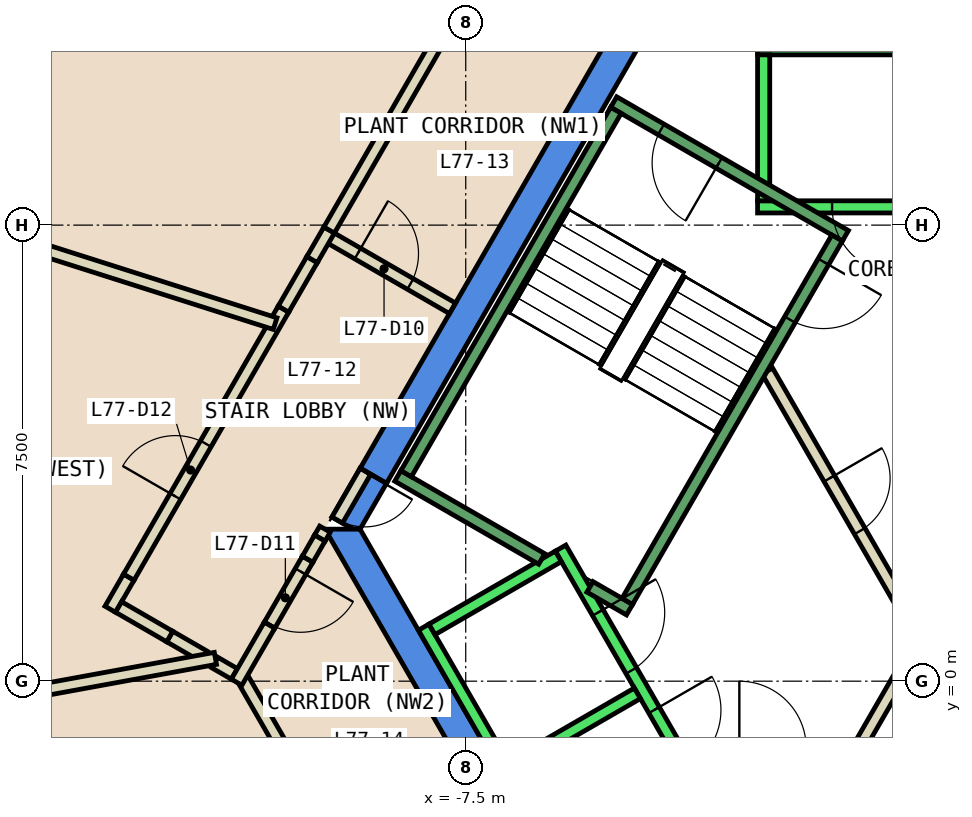
"""IFC4 building model, lengths in metres.
Left out: names, types, materials, properties, quantities, classifications, styles, units other than length and angle.
Written with IfcOpenShell. Run it as: python <this file> out.ifc"""

import sys

from ifc_helpers import new_model, si_unit, direction, frame, frame_2d, origin, place, context, subcontext, project, spatial, polyline, rectangle, outline, extrude, element, fill, save


model = new_model("IFC4")
c1 = context("Model", 3, precision=1e-05, world=origin(), true_north=direction((0.0, 1.0)))
c2 = subcontext(c1, "Body", "Model", "MODEL_VIEW")
j1 = project(units=[si_unit("LENGTHUNIT", "METRE"), si_unit("PLANEANGLEUNIT", "RADIAN")], contexts=[c1])
p1 = place(None, origin())
s1 = spatial("IfcSite", under=j1, at=p1, CompositionType="ELEMENT")
p2 = place(p1, origin())
s2 = spatial("IfcBuilding", under=s1, at=p2, CompositionType="ELEMENT")
p3 = place(p2, frame((0.0, 0.0, 326.0)))
s3 = spatial("IfcBuildingStorey", under=s2, at=p3, CompositionType="ELEMENT", Elevation=326.0)
p4 = place(p3, frame((0.0, 0.0, -0.6)))
e1 = element("IfcWall", 1, at=p4, inside=s3, PredefinedType="SHEAR", context=c2, shape_type="SweptSolid", body=[
    extrude(outline(polyline([(-9.236, 3.502), (-8.803, 3.253), (-4.619, 10.5), (-4.907, 11.0), (-9.236, 3.502)])), origin(), (0.0, 0.0, 1.0), 5.55),
])
p5 = place(p3, frame((0.0, 0.0, 3.6)))
e2 = element("IfcWall", 2, at=p5, inside=s3, PredefinedType="SHEAR", context=c2, shape_type="SweptSolid", body=[
    extrude(outline(polyline([(-9.7, 2.7), (-9.354, 2.5), (-9.238, 2.5), (-8.803, 3.253), (-9.236, 3.502), (-9.7, 2.7)])), origin(), (0.0, 0.0, 1.0), 1.35),
])
p6 = place(p3, frame((0.0, 0.0, -0.6)))
e3 = element("IfcWall", 3, at=p6, inside=s3, PredefinedType="SHEAR", context=c2, shape_type="SweptSolid", body=[
    extrude(outline(polyline([(-9.815, 2.5), (-4.907, -6.0), (-4.619, -5.5), (-9.238, 2.5), (-9.815, 2.5)])), origin(), (0.0, 0.0, 1.0), 5.55),
])
p7 = place(p3, frame((-0.982, -1.0, 0.0), z_axis=(0.0, 0.0, 1.0), x_axis=(0.50024047865, 0.865886518847, 0.0)))
e4 = element("IfcWall", 4, at=p7, inside=s3, PredefinedType="PARTITIONING", context=c2, shape_type="SweptSolid", body=[
    extrude(rectangle(XDim=1.863, YDim=0.2, at=frame_2d((0.931, 0.0))), origin(), (0.0, 0.0, 1.0), 4.95),
])
p8 = place(p3, frame((-2.54, 5.1, 0.0), z_axis=(0.0, 0.0, 1.0), x_axis=(0.499925051871, -0.866068670783, 0.0)))
e5 = element("IfcWall", 5, at=p8, inside=s3, PredefinedType="PARTITIONING", context=c2, shape_type="SweptSolid", body=[
    extrude(rectangle(XDim=5.181, YDim=0.2, at=frame_2d((2.59, 0.0))), origin(), (0.0, 0.0, 1.0), 4.95),
])
p9 = place(p8, frame((2.04, 0.0, 0.0)))
e6 = element("IfcOpeningElement", 6, at=p9, cuts=e5, PredefinedType="OPENING", context=c2, shape_type="SweptSolid", body=[
    extrude(rectangle(XDim=1.0, YDim=2.1, at=frame_2d((0.5, 1.05))), frame((0.0, 0.11, 0.0), z_axis=(0.0, -1.0, 0.0), x_axis=(1.0, 0.0, 0.0)), (0.0, 0.0, 1.0), 0.22),
])
p10 = place(p3, frame((-9.796, 7.332, 0.0), z_axis=(0.0, 0.0, 1.0), x_axis=(0.865973769406, -0.500089422704, 0.0)))
e7 = element("IfcWall", 7, at=p10, inside=s3, PredefinedType="PARTITIONING", context=c2, shape_type="SweptSolid", body=[
    extrude(rectangle(XDim=2.399, YDim=0.2, at=frame_2d((1.2, 0.0))), origin(), (0.0, 0.0, 1.0), 4.95),
])
p11 = place(p10, frame((0.6, 0.0, 0.0)))
e8 = element("IfcOpeningElement", 8, at=p11, cuts=e7, PredefinedType="OPENING", context=c2, shape_type="SweptSolid", body=[
    extrude(rectangle(XDim=1.0, YDim=2.1, at=frame_2d((0.5, 1.05))), frame((0.0, 0.11, 0.0), z_axis=(0.0, -1.0, 0.0), x_axis=(1.0, 0.0, 0.0)), (0.0, 0.0, 1.0), 0.22),
])
p12 = place(p3, frame((-9.815, 2.5, 0.0), z_axis=(0.0, 0.0, 1.0), x_axis=(-0.5004692653, -0.865754303766, 0.0)))
e9 = element("IfcWall", 9, at=p12, inside=s3, PredefinedType="PARTITIONING", context=c2, shape_type="SweptSolid", body=[
    extrude(rectangle(XDim=0.17, YDim=0.2, at=frame_2d((0.085, 0.0))), origin(), (0.0, 0.0, 1.0), 2.4),
])
p13 = place(p3, frame((-11.802, 0.407, 0.0), z_axis=(0.0, 0.0, 1.0), x_axis=(-0.865911816314, 0.500196687681, 0.0)))
e10 = element("IfcWall", 10, at=p13, inside=s3, PredefinedType="PARTITIONING", context=c2, shape_type="SweptSolid", body=[
    extrude(rectangle(XDim=0.654, YDim=0.2, at=frame_2d((0.327, 0.0))), origin(), (0.0, 0.0, 1.0), 4.95),
])
p14 = place(p3, frame((-13.346, 1.183, 0.0), z_axis=(0.0, 0.0, 1.0), x_axis=(0.500230888849, 0.865892059001, 0.0)))
e11 = element("IfcWall", 11, at=p14, inside=s3, PredefinedType="PARTITIONING", context=c2, shape_type="SweptSolid", body=[
    extrude(rectangle(XDim=0.61, YDim=0.2, at=frame_2d((0.305, 0.0))), origin(), (0.0, 0.0, 1.0), 2.55),
])
p15 = place(p3, frame((-11.305, 0.12, 0.0), z_axis=(0.0, 0.0, 1.0), x_axis=(-0.865694957185, 0.500571914019, 0.0)))
e12 = element("IfcWall", 12, at=p15, inside=s3, PredefinedType="PARTITIONING", context=c2, shape_type="SweptSolid", body=[
    extrude(rectangle(XDim=0.373, YDim=0.2, at=frame_2d((0.187, 0.0))), origin(), (0.0, 0.0, 1.0), 4.95),
])
p16 = place(p3, frame((-9.44, -2.95, 0.0), z_axis=(0.0, 0.0, 1.0), x_axis=(-0.500008478926, 0.866020508419, 0.0)))
e13 = element("IfcWall", 13, at=p16, inside=s3, PredefinedType="PARTITIONING", context=c2, shape_type="SweptSolid", body=[
    extrude(rectangle(XDim=3.522, YDim=0.2, at=frame_2d((1.761, 0.0))), origin(), (0.0, 0.0, 1.0), 4.95),
])
p17 = place(p16, frame((1.245, 0.0, 0.0)))
e14 = element("IfcOpeningElement", 14, at=p17, cuts=e13, PredefinedType="OPENING", context=c2, shape_type="SweptSolid", body=[
    extrude(rectangle(XDim=1.0, YDim=2.1, at=frame_2d((0.5, 1.05))), frame((0.0, 0.11, 0.0), z_axis=(0.0, -1.0, 0.0), x_axis=(1.0, 0.0, 0.0)), (0.0, 0.0, 1.0), 0.22),
])
p18 = place(p3, frame((-11.617, 0.375, 0.0), z_axis=(0.0, 0.0, 1.0), x_axis=(-0.983680709819, -0.179922931086, 0.0)))
e15 = element("IfcWall", 15, at=p18, inside=s3, PredefinedType="PARTITIONING", context=c2, shape_type="SweptSolid", body=[
    extrude(rectangle(XDim=9.732, YDim=0.2, at=frame_2d((4.866, 0.0))), origin(), (0.0, 0.0, 1.0), 4.95),
])
p19 = place(p3, frame((-9.15, 3.452, 0.0), z_axis=(0.0, 0.0, 1.0), x_axis=(-0.500079945886, -0.865979242085, 0.0)))
e16 = element("IfcWall", 16, at=p19, inside=s3, PredefinedType="PARTITIONING", context=c2, shape_type="SweptSolid", body=[
    extrude(rectangle(XDim=0.926, YDim=0.2, at=frame_2d((0.463, 0.0))), origin(), (0.0, 0.0, 1.0), 2.4),
])
p20 = place(p19, frame((0.017, 0.0, 0.0)))
e17 = element("IfcOpeningElement", 17, at=p20, cuts=e16, PredefinedType="OPENING", context=c2, shape_type="SweptSolid", body=[
    extrude(rectangle(XDim=0.9, YDim=2.1, at=frame_2d((0.45, 1.05))), frame((0.0, 0.11, 0.0), z_axis=(0.0, -1.0, 0.0), x_axis=(1.0, 0.0, 0.0)), (0.0, 0.0, 1.0), 0.22),
])
p21 = place(p3, frame((-9.9, 2.353, 0.0), z_axis=(0.0, 0.0, 1.0), x_axis=(-0.499267785915, -0.866447735266, 0.0)))
e18 = element("IfcWall", 18, at=p21, inside=s3, PredefinedType="PARTITIONING", context=c2, shape_type="SweptSolid", body=[
    extrude(rectangle(XDim=0.403, YDim=0.2, at=frame_2d((0.201, 0.0))), origin(), (0.0, 0.0, 1.0), 4.95),
])
p22 = place(p3, frame((-10.101, 2.004, 0.0), z_axis=(0.0, 0.0, 1.0), x_axis=(-0.50008261738, -0.865977699363, 0.0)))
e19 = element("IfcWall", 19, at=p22, inside=s3, PredefinedType="PARTITIONING", context=c2, shape_type="SweptSolid", body=[
    extrude(rectangle(XDim=1.252, YDim=0.2, at=frame_2d((0.626, 0.0))), origin(), (0.0, 0.0, 1.0), 2.55),
])
p23 = place(p22, frame((0.231, 0.0, 0.0)))
e20 = element("IfcOpeningElement", 20, at=p23, cuts=e19, PredefinedType="OPENING", context=c2, shape_type="SweptSolid", body=[
    extrude(rectangle(XDim=1.0, YDim=2.1, at=frame_2d((0.5, 1.05))), frame((0.0, 0.11, 0.0), z_axis=(0.0, -1.0, 0.0), x_axis=(1.0, 0.0, 0.0)), (0.0, 0.0, 1.0), 0.22),
])
p24 = place(p3, frame((-10.727, 0.92, 0.0), z_axis=(0.0, 0.0, 1.0), x_axis=(-0.500021943523, -0.866012734315, 0.0)))
e21 = element("IfcWall", 21, at=p24, inside=s3, PredefinedType="PARTITIONING", context=c2, shape_type="SweptSolid", body=[
    extrude(rectangle(XDim=1.082, YDim=0.2, at=frame_2d((0.541, 0.0))), origin(), (0.0, 0.0, 1.0), 4.95),
])
p25 = place(p3, frame((-12.368, 0.734, 0.0), z_axis=(0.0, 0.0, 1.0), x_axis=(-0.865804585852, 0.500382272985, 0.0)))
e22 = element("IfcWall", 22, at=p25, inside=s3, PredefinedType="PARTITIONING", context=c2, shape_type="SweptSolid", body=[
    extrude(rectangle(XDim=0.971, YDim=0.2, at=frame_2d((0.486, 0.0))), origin(), (0.0, 0.0, 1.0), 2.55),
])
p26 = place(p3, frame((-13.041, 1.711, 0.0), z_axis=(0.0, 0.0, 1.0), x_axis=(0.499853954338, 0.866109706869, 0.0)))
e23 = element("IfcWall", 23, at=p26, inside=s3, PredefinedType="PARTITIONING", context=c2, shape_type="SweptSolid", body=[
    extrude(rectangle(XDim=5.089, YDim=0.2, at=frame_2d((2.545, 0.0))), origin(), (0.0, 0.0, 1.0), 4.95),
])
p27 = place(p26, frame((1.533, 0.0, 0.0)))
e24 = element("IfcOpeningElement", 24, at=p27, cuts=e23, PredefinedType="OPENING", context=c2, shape_type="SweptSolid", body=[
    extrude(rectangle(XDim=1.0, YDim=2.1, at=frame_2d((0.5, 1.05))), frame((0.0, 0.11, 0.0), z_axis=(0.0, -1.0, 0.0), x_axis=(1.0, 0.0, 0.0)), (0.0, 0.0, 1.0), 0.22),
])
p28 = place(p3, frame((-10.497, 6.119, 0.0), z_axis=(0.0, 0.0, 1.0), x_axis=(0.499909789979, 0.8660774803, 0.0)))
e25 = element("IfcWall", 25, at=p28, inside=s3, PredefinedType="PARTITIONING", context=c2, shape_type="SweptSolid", body=[
    extrude(rectangle(XDim=0.94, YDim=0.2, at=frame_2d((0.47, 0.0))), origin(), (0.0, 0.0, 1.0), 2.55),
])
p29 = place(p3, frame((-10.027, 6.933, 0.0), z_axis=(0.0, 0.0, 1.0), x_axis=(0.500676140182, 0.865634681983, 0.0)))
e26 = element("IfcWall", 26, at=p29, inside=s3, PredefinedType="PARTITIONING", context=c2, shape_type="SweptSolid", body=[
    extrude(rectangle(XDim=0.561, YDim=0.2, at=frame_2d((0.281, 0.0))), origin(), (0.0, 0.0, 1.0), 4.95),
])
p30 = place(p3, frame((-7.444, 11.407, 0.0), z_axis=(0.0, 0.0, 1.0), x_axis=(-0.499919806806, -0.866071698396, 0.0)))
e27 = element("IfcWall", 27, at=p30, inside=s3, PredefinedType="PARTITIONING", context=c2, shape_type="SweptSolid", body=[
    extrude(rectangle(XDim=4.605, YDim=0.2, at=frame_2d((2.302, 0.0))), origin(), (0.0, 0.0, 1.0), 4.95),
])
p31 = place(p3, frame((-16.245, 7.663, 0.0), z_axis=(0.0, 0.0, 1.0), x_axis=(0.953015609999, -0.302921189583, 0.0)))
e28 = element("IfcWall", 28, at=p31, inside=s3, PredefinedType="PARTITIONING", context=c2, shape_type="SweptSolid", body=[
    extrude(rectangle(XDim=5.887, YDim=0.2, at=frame_2d((2.943, 0.0))), origin(), (0.0, 0.0, 1.0), 4.95),
])
p32 = place(p3, frame((2.7, 7.8, 0.0), z_axis=(0.0, 0.0, 1.0), x_axis=(-1.0, 0.0, 0.0)))
e29 = element("IfcWall", 29, at=p32, inside=s3, PredefinedType="STANDARD", context=c2, shape_type="SweptSolid", body=[
    extrude(rectangle(XDim=5.4, YDim=0.2, at=frame_2d((2.7, 0.0))), origin(), (0.0, 0.0, 1.0), 4.95),
])
p33 = place(p32, frame((1.225, 0.0, 0.0)))
e30 = element("IfcOpeningElement", 30, at=p33, cuts=e29, PredefinedType="OPENING", context=c2, shape_type="SweptSolid", body=[
    extrude(rectangle(XDim=1.1, YDim=2.1, at=frame_2d((0.55, 1.05))), frame((0.0, 0.11, 0.0), z_axis=(0.0, -1.0, 0.0), x_axis=(1.0, 0.0, 0.0)), (0.0, 0.0, 1.0), 0.22),
])
p34 = place(p32, frame((3.075, 0.0, 0.0)))
e31 = element("IfcOpeningElement", 31, at=p34, cuts=e29, PredefinedType="OPENING", context=c2, shape_type="SweptSolid", body=[
    extrude(rectangle(XDim=1.1, YDim=2.1, at=frame_2d((0.55, 1.05))), frame((0.0, 0.11, 0.0), z_axis=(0.0, -1.0, 0.0), x_axis=(1.0, 0.0, 0.0)), (0.0, 0.0, 1.0), 0.22),
])
p35 = place(p3, frame((2.7, 10.4, 0.0), z_axis=(0.0, 0.0, 1.0), x_axis=(-1.0, 0.0, 0.0)))
e32 = element("IfcWall", 32, at=p35, inside=s3, PredefinedType="STANDARD", context=c2, shape_type="SweptSolid", body=[
    extrude(rectangle(XDim=5.4, YDim=0.2, at=frame_2d((2.7, 0.0))), origin(), (0.0, 0.0, 1.0), 4.95),
])
p36 = place(p3, frame((-2.6, 7.9, 0.0), z_axis=(0.0, 0.0, 1.0), x_axis=(0.0, 1.0, 0.0)))
e33 = element("IfcWall", 33, at=p36, inside=s3, PredefinedType="STANDARD", context=c2, shape_type="SweptSolid", body=[
    extrude(rectangle(XDim=2.4, YDim=0.2, at=frame_2d((1.2, 0.0))), origin(), (0.0, 0.0, 1.0), 4.95),
])
p37 = place(p3, frame((-5.94, 2.188, 0.0), z_axis=(0.0, 0.0, 1.0), x_axis=(0.500034260056, -0.866005622828, 0.0)))
e34 = element("IfcWall", 34, at=p37, inside=s3, PredefinedType="STANDARD", context=c2, shape_type="SweptSolid", body=[
    extrude(rectangle(XDim=5.399, YDim=0.2, at=frame_2d((2.7, 0.0))), origin(), (0.0, 0.0, 1.0), 4.95),
])
p38 = place(p37, frame((3.075, 0.0, 0.0)))
e35 = element("IfcOpeningElement", 35, at=p38, cuts=e34, PredefinedType="OPENING", context=c2, shape_type="SweptSolid", body=[
    extrude(rectangle(XDim=1.1, YDim=2.1, at=frame_2d((0.55, 1.05))), frame((0.0, 0.11, 0.0), z_axis=(0.0, -1.0, 0.0), x_axis=(1.0, 0.0, 0.0)), (0.0, 0.0, 1.0), 0.22),
])
p39 = place(p37, frame((1.225, 0.0, 0.0)))
e36 = element("IfcOpeningElement", 36, at=p39, cuts=e34, PredefinedType="OPENING", context=c2, shape_type="SweptSolid", body=[
    extrude(rectangle(XDim=1.1, YDim=2.1, at=frame_2d((0.55, 1.05))), frame((0.0, 0.11, 0.0), z_axis=(0.0, -1.0, 0.0), x_axis=(1.0, 0.0, 0.0)), (0.0, 0.0, 1.0), 0.22),
])
p40 = place(p3, frame((-8.192, 0.888, 0.0), z_axis=(0.0, 0.0, 1.0), x_axis=(0.500034260056, -0.866005622828, 0.0)))
e37 = element("IfcWall", 37, at=p40, inside=s3, PredefinedType="STANDARD", context=c2, shape_type="SweptSolid", body=[
    extrude(rectangle(XDim=5.399, YDim=0.2, at=frame_2d((2.7, 0.0))), origin(), (0.0, 0.0, 1.0), 4.95),
])
for number, where, z_axis, x_axis in (
    (38, (-5.977, 2.052, 0.0), (0.0, 0.0, 1.0), (-0.866, -0.5, 0.0)),
    (39, (-4.677, -0.2, 0.0), (0.0, 0.0, 1.0), (-0.866, -0.5, 0.0)),
):
    element("IfcWall", number, at=place(p3, frame(where, z_axis=z_axis, x_axis=x_axis)), inside=s3, PredefinedType="STANDARD", context=c2, shape_type="SweptSolid", body=[
        extrude(rectangle(XDim=2.399, YDim=0.2, at=frame_2d((1.2, 0.0))), origin(), (0.0, 0.0, 1.0), 4.95),
    ])
p41 = place(p3, frame((-1.256, 7.324, 0.0), z_axis=(0.0, 0.0, 1.0), x_axis=(-0.866046073146, 0.499964197906, 0.0)))
e40 = element("IfcWall", 40, at=p41, inside=s3, PredefinedType="STANDARD", context=c2, shape_type="SweptSolid", body=[
    extrude(rectangle(XDim=4.4, YDim=0.2, at=frame_2d((2.2, 0.0))), origin(), (0.0, 0.0, 1.0), 4.95),
])
p42 = place(p41, frame((2.4, 0.0, 0.0)))
e41 = element("IfcOpeningElement", 41, at=p42, cuts=e40, PredefinedType="OPENING", context=c2, shape_type="SweptSolid", body=[
    extrude(rectangle(XDim=1.1, YDim=2.2, at=frame_2d((0.55, 1.1))), frame((0.0, 0.11, 0.0), z_axis=(0.0, -1.0, 0.0), x_axis=(1.0, 0.0, 0.0)), (0.0, 0.0, 1.0), 0.22),
])
p43 = place(p3, frame((-6.25, 2.01, 0.0), z_axis=(0.0, 0.0, 1.0), x_axis=(-0.86611865017, 0.499838457731, 0.0)))
e42 = element("IfcWall", 42, at=p43, inside=s3, PredefinedType="STANDARD", context=c2, shape_type="SweptSolid", body=[
    extrude(rectangle(XDim=2.733, YDim=0.2, at=frame_2d((1.366, 0.0))), origin(), (0.0, 0.0, 1.0), 4.95),
])
p44 = place(p3, frame((-4.806, 1.176, 0.0), z_axis=(0.0, 0.0, 1.0), x_axis=(-0.866558586415, 0.499075361355, 0.0)))
e43 = element("IfcWall", 43, at=p44, inside=s3, PredefinedType="STANDARD", context=c2, shape_type="SweptSolid", body=[
    extrude(rectangle(XDim=0.751, YDim=0.2, at=frame_2d((0.376, 0.0))), origin(), (0.0, 0.0, 1.0), 4.95),
])
p45 = place(p3, frame((-1.393, 7.288, 0.0), z_axis=(0.0, 0.0, 1.0), x_axis=(-0.499963383562, -0.866046543262, 0.0)))
e44 = element("IfcWall", 44, at=p45, inside=s3, PredefinedType="STANDARD", context=c2, shape_type="SweptSolid", body=[
    extrude(rectangle(XDim=6.9, YDim=0.2, at=frame_2d((3.45, 0.0))), origin(), (0.0, 0.0, 1.0), 4.95),
])
p46 = place(p45, frame((0.45, 0.0, 0.0)))
e45 = element("IfcOpeningElement", 45, at=p46, cuts=e44, PredefinedType="OPENING", context=c2, shape_type="SweptSolid", body=[
    extrude(rectangle(XDim=1.1, YDim=2.2, at=frame_2d((0.55, 1.1))), frame((0.0, 0.11, 0.0), z_axis=(0.0, -1.0, 0.0), x_axis=(1.0, 0.0, 0.0)), (0.0, 0.0, 1.0), 0.22),
])
p47 = place(p3, frame((-5.03, 9.388, 0.0), z_axis=(0.0, 0.0, 1.0), x_axis=(-0.499978703459, -0.866037698999, 0.0)))
e46 = element("IfcWall", 46, at=p47, inside=s3, PredefinedType="STANDARD", context=c2, shape_type="SweptSolid", body=[
    extrude(rectangle(XDim=6.9, YDim=0.2, at=frame_2d((3.45, 0.0))), origin(), (0.0, 0.0, 1.0), 4.95),
])
p48 = place(p11, origin())
e47 = element("IfcDoor", 47, at=p48, inside=s3, OperationType="SINGLE_SWING_LEFT", PredefinedType="DOOR", context=c2, shape_type="SweptSolid", body=[
    extrude(rectangle(XDim=1.0, YDim=2.1, at=frame_2d((0.5, 1.05))), frame((0.0, 0.025, 0.0), z_axis=(0.0, -1.0, 0.0), x_axis=(1.0, 0.0, 0.0)), (0.0, 0.0, 1.0), 0.05),
])
fill(e8, e47)
p49 = place(p23, origin())
e48 = element("IfcDoor", 48, at=p49, inside=s3, OperationType="SINGLE_SWING_RIGHT", PredefinedType="DOOR", context=c2, shape_type="SweptSolid", body=[
    extrude(rectangle(XDim=1.0, YDim=2.1, at=frame_2d((0.5, 1.05))), frame((0.0, 0.025, 0.0), z_axis=(0.0, -1.0, 0.0), x_axis=(1.0, 0.0, 0.0)), (0.0, 0.0, 1.0), 0.05),
])
fill(e20, e48)
p50 = place(p27, origin())
e49 = element("IfcDoor", 49, at=p50, inside=s3, OperationType="SINGLE_SWING_LEFT", PredefinedType="DOOR", context=c2, shape_type="SweptSolid", body=[
    extrude(rectangle(XDim=1.0, YDim=2.1, at=frame_2d((0.5, 1.05))), frame((0.0, 0.025, 0.0), z_axis=(0.0, -1.0, 0.0), x_axis=(1.0, 0.0, 0.0)), (0.0, 0.0, 1.0), 0.05),
])
fill(e24, e49)
p51 = place(p9, origin())
e50 = element("IfcDoor", 50, at=p51, inside=s3, OperationType="SINGLE_SWING_RIGHT", PredefinedType="DOOR", context=c2, shape_type="SweptSolid", body=[
    extrude(rectangle(XDim=1.0, YDim=2.1, at=frame_2d((0.5, 1.05))), frame((0.0, 0.025, 0.0), z_axis=(0.0, -1.0, 0.0), x_axis=(1.0, 0.0, 0.0)), (0.0, 0.0, 1.0), 0.05),
])
fill(e6, e50)
p52 = place(p20, origin())
e51 = element("IfcDoor", 51, at=p52, inside=s3, OperationType="SINGLE_SWING_LEFT", PredefinedType="DOOR", context=c2, shape_type="SweptSolid", body=[
    extrude(rectangle(XDim=0.9, YDim=2.1, at=frame_2d((0.45, 1.05))), frame((0.0, 0.025, 0.0), z_axis=(0.0, -1.0, 0.0), x_axis=(1.0, 0.0, 0.0)), (0.0, 0.0, 1.0), 0.05),
])
fill(e17, e51)
p53 = place(p34, origin())
e52 = element("IfcDoor", 52, at=p53, inside=s3, OperationType="SLIDING_TO_LEFT", PredefinedType="DOOR", context=c2, shape_type="SweptSolid", body=[
    extrude(rectangle(XDim=1.1, YDim=2.1, at=frame_2d((0.55, 1.05))), frame((0.0, 0.025, 0.0), z_axis=(0.0, -1.0, 0.0), x_axis=(1.0, 0.0, 0.0)), (0.0, 0.0, 1.0), 0.05),
])
fill(e31, e52)
p54 = place(p38, origin())
e53 = element("IfcDoor", 53, at=p54, inside=s3, OperationType="SLIDING_TO_LEFT", PredefinedType="DOOR", context=c2, shape_type="SweptSolid", body=[
    extrude(rectangle(XDim=1.1, YDim=2.1, at=frame_2d((0.55, 1.05))), frame((0.0, 0.025, 0.0), z_axis=(0.0, -1.0, 0.0), x_axis=(1.0, 0.0, 0.0)), (0.0, 0.0, 1.0), 0.05),
])
fill(e35, e53)
p55 = place(p39, origin())
e54 = element("IfcDoor", 54, at=p55, inside=s3, OperationType="SLIDING_TO_LEFT", PredefinedType="DOOR", context=c2, shape_type="SweptSolid", body=[
    extrude(rectangle(XDim=1.1, YDim=2.1, at=frame_2d((0.55, 1.05))), frame((0.0, 0.025, 0.0), z_axis=(0.0, -1.0, 0.0), x_axis=(1.0, 0.0, 0.0)), (0.0, 0.0, 1.0), 0.05),
])
fill(e36, e54)
p56 = place(p46, origin())
e55 = element("IfcDoor", 55, at=p56, inside=s3, OperationType="SINGLE_SWING_LEFT", PredefinedType="DOOR", context=c2, shape_type="SweptSolid", body=[
    extrude(rectangle(XDim=1.1, YDim=2.2, at=frame_2d((0.55, 1.1))), frame((0.0, 0.025, 0.0), z_axis=(0.0, -1.0, 0.0), x_axis=(1.0, 0.0, 0.0)), (0.0, 0.0, 1.0), 0.05),
])
fill(e45, e55)
p57 = place(p42, origin())
e56 = element("IfcDoor", 56, at=p57, inside=s3, OperationType="SINGLE_SWING_LEFT", PredefinedType="DOOR", context=c2, shape_type="SweptSolid", body=[
    extrude(rectangle(XDim=1.1, YDim=2.2, at=frame_2d((0.55, 1.1))), frame((0.0, 0.025, 0.0), z_axis=(0.0, -1.0, 0.0), x_axis=(1.0, 0.0, 0.0)), (0.0, 0.0, 1.0), 0.05),
])
fill(e41, e56)
save(model, sys.argv[1])
